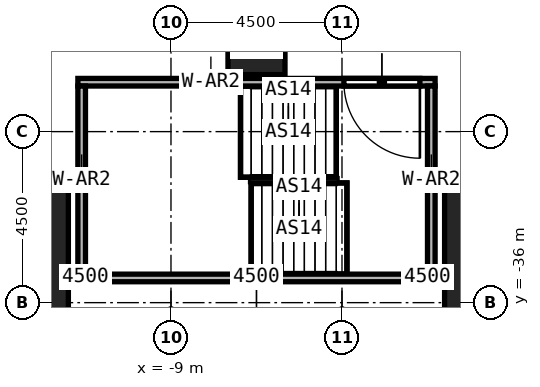
"""IFC4 building model, lengths in metres.
Left out: names, types, materials, properties, quantities, classifications, styles, units other than length and angle.
Written with IfcOpenShell. Run it as: python <this file> out.ifc"""

import sys

from ifc_helpers import new_model, si_unit, direction, frame, frame_2d, origin, origin_2d, place, context, subcontext, project, spatial, rectangle, extrude, element, fill, save


model = new_model("IFC4")
c1 = context("Model", 3, precision=1e-05, world=origin(), true_north=direction((0.0, 1.0)))
c2 = subcontext(c1, "Body", "Model", "MODEL_VIEW")
j1 = project(units=[si_unit("LENGTHUNIT", "METRE"), si_unit("PLANEANGLEUNIT", "RADIAN")], contexts=[c1])
p1 = place(None, origin())
s1 = spatial("IfcSite", under=j1, at=p1, CompositionType="ELEMENT")
p2 = place(p1, origin())
s2 = spatial("IfcBuilding", under=s1, at=p2, CompositionType="ELEMENT")
p3 = place(p2, frame((0.0, 0.0, 25.0)))
s3 = spatial("IfcBuildingStorey", under=s2, at=p3, CompositionType="ELEMENT", Elevation=25.0)
for number, where, z_axis, x_axis in (
    (1, (-13.5, -36.0, 0.0), (0.0, 0.0, 1.0), (1.0, 0.0, 0.0)),
    (2, (0.0, -36.0, 0.0), (0.0, 0.0, 1.0), (1.0, 0.0, 0.0)),
):
    element("IfcColumn", number, at=place(p3, frame(where, z_axis=z_axis, x_axis=x_axis)), inside=s3, PredefinedType="COLUMN", context=c2, shape_type="SweptSolid", body=[
        extrude(rectangle(XDim=3.6, YDim=6.0, at=origin_2d()), origin(), (0.0, 0.0, 1.0), 6.0),
    ])
p4 = place(p3, frame((-6.75, -29.25, 0.0), z_axis=(0.0, 0.0, 1.0), x_axis=(1.0, 0.0, 0.0)))
e3 = element("IfcColumn", 3, at=p4, inside=s3, PredefinedType="COLUMN", context=c2, shape_type="SweptSolid", body=[
    extrude(rectangle(XDim=1.5, YDim=1.5, at=origin_2d()), origin(), (0.0, 0.0, 1.0), 6.0),
])
p5 = place(p3, frame((-2.05, -30.2, 0.0), z_axis=(0.0, 0.0, 1.0), x_axis=(-1.0, 0.0, 0.0)))
e4 = element("IfcWall", 4, at=p5, inside=s3, PredefinedType="SOLIDWALL", context=c2, shape_type="SweptSolid", body=[
    extrude(rectangle(XDim=9.4, YDim=0.2, at=frame_2d((4.7, 0.0))), origin(), (0.0, 0.0, 1.0), 6.0),
])
p6 = place(p5, frame((0.4, 0.0, 0.0)))
e5 = element("IfcOpeningElement", 5, at=p6, cuts=e4, PredefinedType="OPENING", context=c2, shape_type="SweptSolid", body=[
    extrude(rectangle(XDim=2.0, YDim=2.4, at=frame_2d((1.0, 1.2))), frame((0.0, 0.1, 0.0), z_axis=(0.0, -1.0, 0.0), x_axis=(1.0, 0.0, 0.0)), (0.0, 0.0, 1.0), 0.2),
])
p7 = place(p3, frame((-11.45, -35.35, 0.0), z_axis=(0.0, 0.0, 1.0), x_axis=(1.0, 0.0, 0.0)))
e6 = element("IfcWall", 6, at=p7, inside=s3, PredefinedType="SOLIDWALL", context=c2, shape_type="SweptSolid", body=[
    extrude(rectangle(XDim=9.4, YDim=0.2, at=frame_2d((4.7, 0.0))), origin(), (0.0, 0.0, 1.0), 6.0),
])
for number, where, z_axis, x_axis in (
    (7, (-11.35, -35.25, 0.0), (0.0, 0.0, 1.0), (0.0, 1.0, 0.0)),
    (8, (-2.15, -35.25, 0.0), (0.0, 0.0, 1.0), (0.0, 1.0, 0.0)),
):
    element("IfcWall", number, at=place(p3, frame(where, z_axis=z_axis, x_axis=x_axis)), inside=s3, PredefinedType="SOLIDWALL", context=c2, shape_type="SweptSolid", body=[
        extrude(rectangle(XDim=4.95, YDim=0.2, at=frame_2d((2.475, 0.0))), origin(), (0.0, 0.0, 1.0), 6.0),
    ])
p8 = place(p6, origin())
e9 = element("IfcDoor", 9, at=p8, inside=s3, OperationType="DOUBLE_DOOR_SINGLE_SWING", PredefinedType="DOOR", context=c2, shape_type="SweptSolid", body=[
    extrude(rectangle(XDim=2.0, YDim=2.4, at=frame_2d((1.0, 1.2))), frame((0.0, 0.025, 0.0), z_axis=(0.0, -1.0, 0.0), x_axis=(1.0, 0.0, 0.0)), (0.0, 0.0, 1.0), 0.05),
])
fill(e5, e9)
save(model, sys.argv[1])
